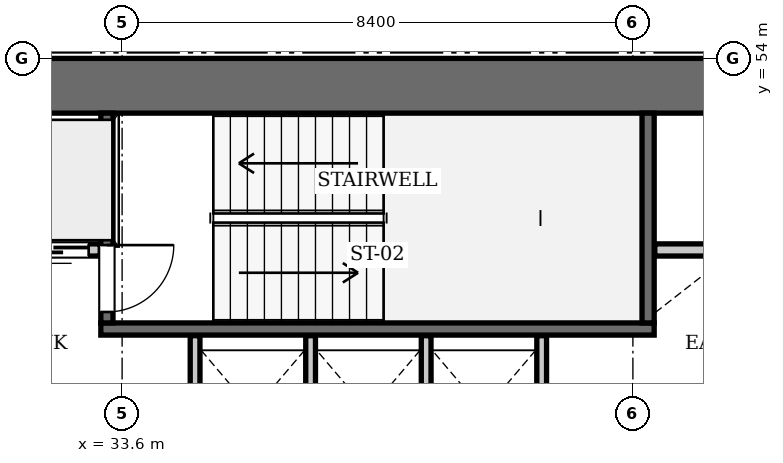
"""IFC4 building model, lengths in metres.
Left out: names, types, materials, properties, quantities, classifications, styles, units other than length and angle.
Written with IfcOpenShell. Run it as: python <this file> out.ifc"""

import sys

from ifc_helpers import new_model, si_unit, direction, frame, frame_2d, origin, place, context, subcontext, project, spatial, rectangle, extrude, element, fill, save


model = new_model("IFC4")
c1 = context("Model", 3, precision=1e-05, world=origin(), true_north=direction((0.0, 1.0)))
c2 = subcontext(c1, "Body", "Model", "MODEL_VIEW")
j1 = project(units=[si_unit("LENGTHUNIT", "METRE"), si_unit("PLANEANGLEUNIT", "RADIAN")], contexts=[c1])
p1 = place(None, origin())
s1 = spatial("IfcSite", under=j1, at=p1, CompositionType="ELEMENT")
p2 = place(p1, origin())
s2 = spatial("IfcBuilding", under=s1, at=p2, CompositionType="ELEMENT")
p3 = place(p2, frame((0.0, 0.0, 92.4)))
s3 = spatial("IfcBuildingStorey", under=s2, at=p3, CompositionType="ELEMENT", Elevation=92.4)
p4 = place(p3, frame((25.2, 53.55, 0.0), z_axis=(0.0, 0.0, 1.0), x_axis=(1.0, 0.0, 0.0)))
e1 = element("IfcWall", 1, at=p4, inside=s3, PredefinedType="SHEAR", context=c2, shape_type="SweptSolid", body=[
    extrude(rectangle(XDim=25.2, YDim=0.9, at=frame_2d((12.6, 0.0))), origin(), (0.0, 0.0, 1.0), 3.85),
])
p5 = place(p3, frame((33.25, 49.55, 0.0), z_axis=(0.0, 0.0, 1.0), x_axis=(1.0, 0.0, 0.0)))
e2 = element("IfcWall", 2, at=p5, inside=s3, PredefinedType="SOLIDWALL", context=c2, shape_type="SweptSolid", body=[
    extrude(rectangle(XDim=9.1, YDim=0.2, at=frame_2d((4.55, 0.0))), origin(), (0.0, 0.0, 1.0), 3.61),
])
p6 = place(p3, frame((42.25, 49.65, 0.0), z_axis=(0.0, 0.0, 1.0), x_axis=(0.0, 1.0, 0.0)))
e3 = element("IfcWall", 3, at=p6, inside=s3, PredefinedType="SOLIDWALL", context=c2, shape_type="SweptSolid", body=[
    extrude(rectangle(XDim=3.45, YDim=0.2, at=frame_2d((1.725, 0.0))), origin(), (0.0, 0.0, 1.0), 3.61),
])
p7 = place(p3, frame((33.35, 49.65, 0.0), z_axis=(0.0, 0.0, 1.0), x_axis=(0.0, 1.0, 0.0)))
e4 = element("IfcWall", 4, at=p7, inside=s3, PredefinedType="SOLIDWALL", context=c2, shape_type="SweptSolid", body=[
    extrude(rectangle(XDim=3.45, YDim=0.2, at=frame_2d((1.725, 0.0))), origin(), (0.0, 0.0, 1.0), 3.61),
])
p8 = place(p7, frame((0.18, 0.0, 0.0)))
e5 = element("IfcOpeningElement", 5, at=p8, cuts=e4, PredefinedType="OPENING", context=c2, shape_type="SweptSolid", body=[
    extrude(rectangle(XDim=1.1, YDim=2.15, at=frame_2d((0.55, 1.075))), frame((0.0, 0.11, 0.0), z_axis=(0.0, -1.0, 0.0), x_axis=(1.0, 0.0, 0.0)), (0.0, 0.0, 1.0), 0.22),
])
p9 = place(p3, frame((31.86, 50.85, 0.0), z_axis=(0.0, 0.0, 1.0), x_axis=(1.0, 0.0, 0.0)))
e6 = element("IfcWall", 6, at=p9, inside=s3, PredefinedType="SOLIDWALL", context=c2, shape_type="SweptSolid", body=[
    extrude(rectangle(XDim=1.38, YDim=0.2, at=frame_2d((0.69, 0.0))), origin(), (0.0, 0.0, 1.0), 3.61),
])
p10 = place(p9, frame((0.19, 0.0, 0.0)))
e7 = element("IfcOpeningElement", 7, at=p10, cuts=e6, PredefinedType="OPENING", context=c2, shape_type="SweptSolid", body=[
    extrude(rectangle(XDim=1.0, YDim=2.15, at=frame_2d((0.5, 1.075))), frame((0.0, 0.11, 0.0), z_axis=(0.0, -1.0, 0.0), x_axis=(1.0, 0.0, 0.0)), (0.0, 0.0, 1.0), 0.22),
])
p11 = place(p3, frame((42.36, 50.85, 0.0), z_axis=(0.0, 0.0, 1.0), x_axis=(1.0, 0.0, 0.0)))
e8 = element("IfcWall", 8, at=p11, inside=s3, PredefinedType="SOLIDWALL", context=c2, shape_type="SweptSolid", body=[
    extrude(rectangle(XDim=1.38, YDim=0.2, at=frame_2d((0.69, 0.0))), origin(), (0.0, 0.0, 1.0), 3.61),
])
for number, where, z_axis, x_axis in (
    (9, (34.8, 47.25, 0.0), (0.0, 0.0, 1.0), (0.0, 1.0, 0.0)),
    (10, (36.7, 47.25, 0.0), (0.0, 0.0, 1.0), (0.0, 1.0, 0.0)),
    (11, (38.6, 47.25, 0.0), (0.0, 0.0, 1.0), (0.0, 1.0, 0.0)),
    (12, (40.5, 47.25, 0.0), (0.0, 0.0, 1.0), (0.0, 1.0, 0.0)),
):
    element("IfcWall", number, at=place(p3, frame(where, z_axis=z_axis, x_axis=x_axis)), inside=s3, PredefinedType="SOLIDWALL", context=c2, shape_type="SweptSolid", body=[
        extrude(rectangle(XDim=2.19, YDim=0.16, at=frame_2d((1.095, 0.0))), origin(), (0.0, 0.0, 1.0), 3.61),
    ])
p12 = place(p8, frame((1.1, 0.0, 0.0), z_axis=(0.0, 0.0, 1.0), x_axis=(-1.0, 0.0, 0.0)))
e13 = element("IfcDoor", 13, at=p12, inside=s3, OperationType="SINGLE_SWING_LEFT", PredefinedType="DOOR", context=c2, shape_type="SweptSolid", body=[
    extrude(rectangle(XDim=1.1, YDim=2.15, at=frame_2d((0.55, 1.075))), frame((0.0, 0.025, 0.0), z_axis=(0.0, -1.0, 0.0), x_axis=(1.0, 0.0, 0.0)), (0.0, 0.0, 1.0), 0.05),
])
fill(e5, e13)
p13 = place(p10, frame((1.0, 0.0, 0.0), z_axis=(0.0, 0.0, 1.0), x_axis=(-1.0, 0.0, 0.0)))
e14 = element("IfcDoor", 14, at=p13, inside=s3, OperationType="SLIDING_TO_LEFT", PredefinedType="DOOR", context=c2, shape_type="SweptSolid", body=[
    extrude(rectangle(XDim=1.0, YDim=2.15, at=frame_2d((0.5, 1.075))), frame((0.0, 0.025, 0.0), z_axis=(0.0, -1.0, 0.0), x_axis=(1.0, 0.0, 0.0)), (0.0, 0.0, 1.0), 0.05),
])
fill(e7, e14)
save(model, sys.argv[1])
